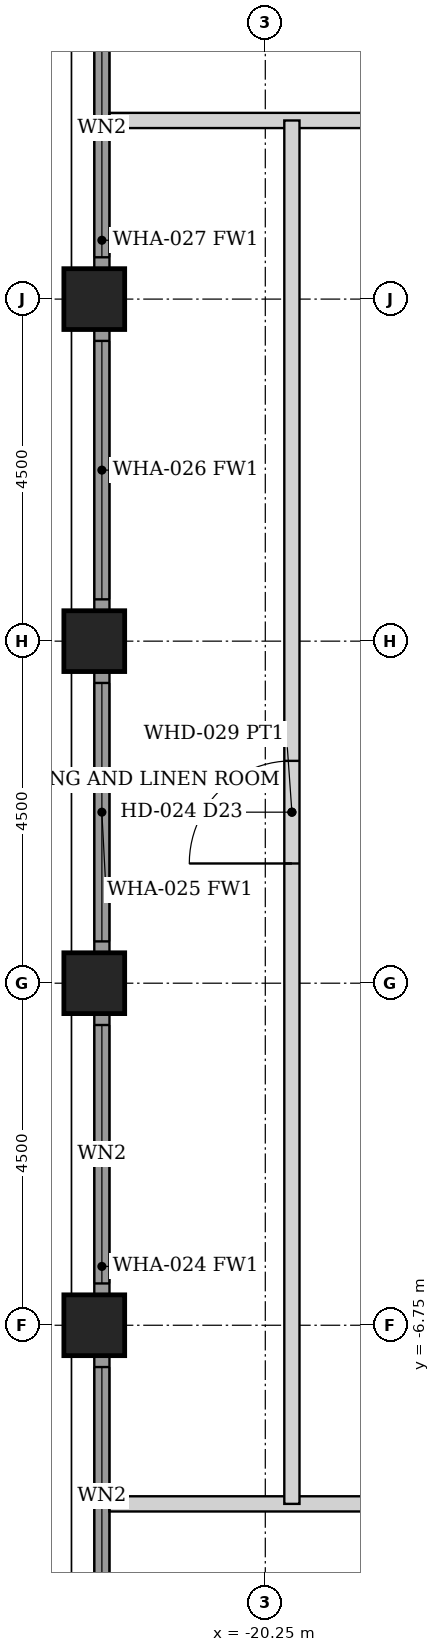
"""IFC4 building model, lengths in metres.
Left out: names, types, materials, properties, quantities, classifications, styles, units other than length and angle.
Written with IfcOpenShell. Run it as: python <this file> out.ifc"""

import sys

from ifc_helpers import new_model, si_unit, direction, frame, frame_2d, origin, origin_2d, place, context, subcontext, project, spatial, rectangle, hollow_rectangle, extrude, element, fill, save


model = new_model("IFC4")
c1 = context("Model", 3, precision=1e-05, world=origin(), true_north=direction((0.0, 1.0)))
c2 = subcontext(c1, "Body", "Model", "MODEL_VIEW")
j1 = project(units=[si_unit("LENGTHUNIT", "METRE"), si_unit("PLANEANGLEUNIT", "RADIAN")], contexts=[c1])
p1 = place(None, origin())
s1 = spatial("IfcSite", under=j1, at=p1, CompositionType="ELEMENT")
p2 = place(p1, origin())
s2 = spatial("IfcBuilding", under=s1, at=p2, CompositionType="ELEMENT")
p3 = place(p2, frame((0.0, 0.0, 150.8)))
s3 = spatial("IfcBuildingStorey", under=s2, at=p3, CompositionType="ELEMENT", Elevation=150.8)
for number, where, z_axis, x_axis in (
    (1, (-22.5, -6.75, 0.0), (0.0, 0.0, 1.0), (1.0, 0.0, 0.0)),
    (2, (-22.5, -2.25, 0.0), (0.0, 0.0, 1.0), (1.0, 0.0, 0.0)),
    (3, (-22.5, 2.25, 0.0), (0.0, 0.0, 1.0), (1.0, 0.0, 0.0)),
    (4, (-22.5, 6.75, 0.0), (0.0, 0.0, 1.0), (1.0, 0.0, 0.0)),
):
    element("IfcColumn", number, at=place(p3, frame(where, z_axis=z_axis, x_axis=x_axis)), inside=s3, PredefinedType="COLUMN", context=c2, shape_type="SweptSolid", body=[
        extrude(hollow_rectangle(XDim=0.8, YDim=0.8, WallThickness=0.05, at=origin_2d()), origin(), (0.0, 0.0, 1.0), 3.6),
    ])
p4 = place(p3, frame((-22.4, -10.845, 0.0), z_axis=(0.0, 0.0, 1.0), x_axis=(0.0, 1.0, 0.0)))
e5 = element("IfcWall", 5, at=p4, inside=s3, PredefinedType="SOLIDWALL", context=c2, shape_type="SweptSolid", body=[
    extrude(rectangle(XDim=3.69, YDim=0.2, at=frame_2d((1.845, 0.0))), origin(), (0.0, 0.0, 1.0), 2.479),
])
p5 = place(p4, frame((0.145, 0.0, 0.3)))
e6 = element("IfcOpeningElement", 6, at=p5, cuts=e5, PredefinedType="OPENING", context=c2, shape_type="SweptSolid", body=[
    extrude(rectangle(XDim=3.4, YDim=2.029, at=frame_2d((1.7, 1.015))), frame((0.0, 0.11, 0.0), z_axis=(0.0, -1.0, 0.0), x_axis=(1.0, 0.0, 0.0)), (0.0, 0.0, 1.0), 0.22),
])
p6 = place(p3, frame((-22.4, -6.345, 0.0), z_axis=(0.0, 0.0, 1.0), x_axis=(0.0, 1.0, 0.0)))
e7 = element("IfcWall", 7, at=p6, inside=s3, PredefinedType="SOLIDWALL", context=c2, shape_type="SweptSolid", body=[
    extrude(rectangle(XDim=3.69, YDim=0.2, at=frame_2d((1.845, 0.0))), origin(), (0.0, 0.0, 1.0), 2.479),
])
p7 = place(p6, frame((0.145, 0.0, 0.3)))
e8 = element("IfcOpeningElement", 8, at=p7, cuts=e7, PredefinedType="OPENING", context=c2, shape_type="SweptSolid", body=[
    extrude(rectangle(XDim=3.4, YDim=2.029, at=frame_2d((1.7, 1.015))), frame((0.0, 0.11, 0.0), z_axis=(0.0, -1.0, 0.0), x_axis=(1.0, 0.0, 0.0)), (0.0, 0.0, 1.0), 0.22),
])
p8 = place(p3, frame((-22.4, -1.845, 0.0), z_axis=(0.0, 0.0, 1.0), x_axis=(0.0, 1.0, 0.0)))
e9 = element("IfcWall", 9, at=p8, inside=s3, PredefinedType="SOLIDWALL", context=c2, shape_type="SweptSolid", body=[
    extrude(rectangle(XDim=3.69, YDim=0.2, at=frame_2d((1.845, 0.0))), origin(), (0.0, 0.0, 1.0), 2.479),
])
p9 = place(p8, frame((0.145, 0.0, 0.3)))
e10 = element("IfcOpeningElement", 10, at=p9, cuts=e9, PredefinedType="OPENING", context=c2, shape_type="SweptSolid", body=[
    extrude(rectangle(XDim=3.4, YDim=2.029, at=frame_2d((1.7, 1.015))), frame((0.0, 0.11, 0.0), z_axis=(0.0, -1.0, 0.0), x_axis=(1.0, 0.0, 0.0)), (0.0, 0.0, 1.0), 0.22),
])
p10 = place(p3, frame((-22.4, 2.655, 0.0), z_axis=(0.0, 0.0, 1.0), x_axis=(0.0, 1.0, 0.0)))
e11 = element("IfcWall", 11, at=p10, inside=s3, PredefinedType="SOLIDWALL", context=c2, shape_type="SweptSolid", body=[
    extrude(rectangle(XDim=3.69, YDim=0.2, at=frame_2d((1.845, 0.0))), origin(), (0.0, 0.0, 1.0), 2.479),
])
p11 = place(p10, frame((0.145, 0.0, 0.3)))
e12 = element("IfcOpeningElement", 12, at=p11, cuts=e11, PredefinedType="OPENING", context=c2, shape_type="SweptSolid", body=[
    extrude(rectangle(XDim=3.4, YDim=2.029, at=frame_2d((1.7, 1.015))), frame((0.0, 0.11, 0.0), z_axis=(0.0, -1.0, 0.0), x_axis=(1.0, 0.0, 0.0)), (0.0, 0.0, 1.0), 0.22),
])
p12 = place(p3, frame((-22.4, 7.155, 0.0), z_axis=(0.0, 0.0, 1.0), x_axis=(0.0, 1.0, 0.0)))
e13 = element("IfcWall", 13, at=p12, inside=s3, PredefinedType="SOLIDWALL", context=c2, shape_type="SweptSolid", body=[
    extrude(rectangle(XDim=3.69, YDim=0.2, at=frame_2d((1.845, 0.0))), origin(), (0.0, 0.0, 1.0), 2.479),
])
p13 = place(p12, frame((0.145, 0.0, 0.3)))
e14 = element("IfcOpeningElement", 14, at=p13, cuts=e13, PredefinedType="OPENING", context=c2, shape_type="SweptSolid", body=[
    extrude(rectangle(XDim=3.4, YDim=2.029, at=frame_2d((1.7, 1.015))), frame((0.0, 0.11, 0.0), z_axis=(0.0, -1.0, 0.0), x_axis=(1.0, 0.0, 0.0)), (0.0, 0.0, 1.0), 0.22),
])
p14 = place(p3, frame((-22.3, 9.1, 0.0), z_axis=(0.0, 0.0, 1.0), x_axis=(1.0, 0.0, 0.0)))
e15 = element("IfcWall", 15, at=p14, inside=s3, PredefinedType="PARTITIONING", context=c2, shape_type="SweptSolid", body=[
    extrude(rectangle(XDim=44.6, YDim=0.2, at=frame_2d((22.3, 0.0))), origin(), (0.0, 0.0, 1.0), 2.473),
])
p15 = place(p14, frame((6.75, 0.0, 0.0)))
e16 = element("IfcOpeningElement", 16, at=p15, cuts=e15, PredefinedType="OPENING", context=c2, shape_type="SweptSolid", body=[
    extrude(rectangle(XDim=0.9, YDim=2.1, at=frame_2d((0.45, 1.05))), frame((0.0, 0.11, 0.0), z_axis=(0.0, -1.0, 0.0), x_axis=(1.0, 0.0, 0.0)), (0.0, 0.0, 1.0), 0.22),
])
p16 = place(p14, frame((11.25, 0.0, 0.0)))
e17 = element("IfcOpeningElement", 17, at=p16, cuts=e15, PredefinedType="OPENING", context=c2, shape_type="SweptSolid", body=[
    extrude(rectangle(XDim=0.9, YDim=2.1, at=frame_2d((0.45, 1.05))), frame((0.0, 0.11, 0.0), z_axis=(0.0, -1.0, 0.0), x_axis=(1.0, 0.0, 0.0)), (0.0, 0.0, 1.0), 0.22),
])
p17 = place(p14, frame((23.45, 0.0, 0.0)))
e18 = element("IfcOpeningElement", 18, at=p17, cuts=e15, PredefinedType="OPENING", context=c2, shape_type="SweptSolid", body=[
    extrude(rectangle(XDim=0.9, YDim=2.1, at=frame_2d((0.45, 1.05))), frame((0.0, 0.11, 0.0), z_axis=(0.0, -1.0, 0.0), x_axis=(1.0, 0.0, 0.0)), (0.0, 0.0, 1.0), 0.22),
])
p18 = place(p14, frame((32.45, 0.0, 0.0)))
e19 = element("IfcOpeningElement", 19, at=p18, cuts=e15, PredefinedType="OPENING", context=c2, shape_type="SweptSolid", body=[
    extrude(rectangle(XDim=0.9, YDim=2.1, at=frame_2d((0.45, 1.05))), frame((0.0, 0.11, 0.0), z_axis=(0.0, -1.0, 0.0), x_axis=(1.0, 0.0, 0.0)), (0.0, 0.0, 1.0), 0.22),
])
p19 = place(p14, frame((33.75, 0.0, 0.0)))
e20 = element("IfcOpeningElement", 20, at=p19, cuts=e15, PredefinedType="OPENING", context=c2, shape_type="SweptSolid", body=[
    extrude(rectangle(XDim=0.9, YDim=2.1, at=frame_2d((0.45, 1.05))), frame((0.0, 0.11, 0.0), z_axis=(0.0, -1.0, 0.0), x_axis=(1.0, 0.0, 0.0)), (0.0, 0.0, 1.0), 0.22),
])
p20 = place(p14, frame((38.85, 0.0, 0.0)))
e21 = element("IfcOpeningElement", 21, at=p20, cuts=e15, PredefinedType="OPENING", context=c2, shape_type="SweptSolid", body=[
    extrude(rectangle(XDim=0.9, YDim=2.1, at=frame_2d((0.45, 1.05))), frame((0.0, 0.11, 0.0), z_axis=(0.0, -1.0, 0.0), x_axis=(1.0, 0.0, 0.0)), (0.0, 0.0, 1.0), 0.22),
])
p21 = place(p14, frame((4.85, 0.0, 0.0)))
e22 = element("IfcOpeningElement", 22, at=p21, cuts=e15, PredefinedType="OPENING", context=c2, shape_type="SweptSolid", body=[
    extrude(rectangle(XDim=0.9, YDim=2.1, at=frame_2d((0.45, 1.05))), frame((0.0, 0.11, 0.0), z_axis=(0.0, -1.0, 0.0), x_axis=(1.0, 0.0, 0.0)), (0.0, 0.0, 1.0), 0.22),
])
p22 = place(p3, frame((-22.3, -9.1, 0.0), z_axis=(0.0, 0.0, 1.0), x_axis=(1.0, 0.0, 0.0)))
e23 = element("IfcWall", 23, at=p22, inside=s3, PredefinedType="PARTITIONING", context=c2, shape_type="SweptSolid", body=[
    extrude(rectangle(XDim=44.6, YDim=0.2, at=frame_2d((22.3, 0.0))), origin(), (0.0, 0.0, 1.0), 2.473),
])
p23 = place(p22, frame((6.75, 0.0, 0.0)))
e24 = element("IfcOpeningElement", 24, at=p23, cuts=e23, PredefinedType="OPENING", context=c2, shape_type="SweptSolid", body=[
    extrude(rectangle(XDim=0.9, YDim=2.1, at=frame_2d((0.45, 1.05))), frame((0.0, 0.11, 0.0), z_axis=(0.0, -1.0, 0.0), x_axis=(1.0, 0.0, 0.0)), (0.0, 0.0, 1.0), 0.22),
])
p24 = place(p22, frame((15.75, 0.0, 0.0)))
e25 = element("IfcOpeningElement", 25, at=p24, cuts=e23, PredefinedType="OPENING", context=c2, shape_type="SweptSolid", body=[
    extrude(rectangle(XDim=0.9, YDim=2.1, at=frame_2d((0.45, 1.05))), frame((0.0, 0.11, 0.0), z_axis=(0.0, -1.0, 0.0), x_axis=(1.0, 0.0, 0.0)), (0.0, 0.0, 1.0), 0.22),
])
p25 = place(p22, frame((23.45, 0.0, 0.0)))
e26 = element("IfcOpeningElement", 26, at=p25, cuts=e23, PredefinedType="OPENING", context=c2, shape_type="SweptSolid", body=[
    extrude(rectangle(XDim=0.9, YDim=2.1, at=frame_2d((0.45, 1.05))), frame((0.0, 0.11, 0.0), z_axis=(0.0, -1.0, 0.0), x_axis=(1.0, 0.0, 0.0)), (0.0, 0.0, 1.0), 0.22),
])
p26 = place(p22, frame((24.75, 0.0, 0.0)))
e27 = element("IfcOpeningElement", 27, at=p26, cuts=e23, PredefinedType="OPENING", context=c2, shape_type="SweptSolid", body=[
    extrude(rectangle(XDim=0.9, YDim=2.1, at=frame_2d((0.45, 1.05))), frame((0.0, 0.11, 0.0), z_axis=(0.0, -1.0, 0.0), x_axis=(1.0, 0.0, 0.0)), (0.0, 0.0, 1.0), 0.22),
])
p27 = place(p22, frame((36.95, 0.0, 0.0)))
e28 = element("IfcOpeningElement", 28, at=p27, cuts=e23, PredefinedType="OPENING", context=c2, shape_type="SweptSolid", body=[
    extrude(rectangle(XDim=0.9, YDim=2.1, at=frame_2d((0.45, 1.05))), frame((0.0, 0.11, 0.0), z_axis=(0.0, -1.0, 0.0), x_axis=(1.0, 0.0, 0.0)), (0.0, 0.0, 1.0), 0.22),
])
p28 = place(p22, frame((38.85, 0.0, 0.0)))
e29 = element("IfcOpeningElement", 29, at=p28, cuts=e23, PredefinedType="OPENING", context=c2, shape_type="SweptSolid", body=[
    extrude(rectangle(XDim=0.9, YDim=2.1, at=frame_2d((0.45, 1.05))), frame((0.0, 0.11, 0.0), z_axis=(0.0, -1.0, 0.0), x_axis=(1.0, 0.0, 0.0)), (0.0, 0.0, 1.0), 0.22),
])
p29 = place(p22, frame((4.85, 0.0, 0.0)))
e30 = element("IfcOpeningElement", 30, at=p29, cuts=e23, PredefinedType="OPENING", context=c2, shape_type="SweptSolid", body=[
    extrude(rectangle(XDim=0.9, YDim=2.1, at=frame_2d((0.45, 1.05))), frame((0.0, 0.11, 0.0), z_axis=(0.0, -1.0, 0.0), x_axis=(1.0, 0.0, 0.0)), (0.0, 0.0, 1.0), 0.22),
])
p30 = place(p3, frame((-19.9, -9.1, 0.0), z_axis=(0.0, 0.0, 1.0), x_axis=(0.0, 1.0, 0.0)))
e31 = element("IfcWall", 31, at=p30, inside=s3, PredefinedType="PARTITIONING", context=c2, shape_type="SweptSolid", body=[
    extrude(rectangle(XDim=18.2, YDim=0.2, at=frame_2d((9.1, 0.0))), origin(), (0.0, 0.0, 1.0), 2.473),
])
p31 = place(p30, frame((8.425, 0.0, 0.0)))
e32 = element("IfcOpeningElement", 32, at=p31, cuts=e31, PredefinedType="OPENING", context=c2, shape_type="SweptSolid", body=[
    extrude(rectangle(XDim=1.35, YDim=2.1, at=frame_2d((0.675, 1.05))), frame((0.0, 0.11, 0.0), z_axis=(0.0, -1.0, 0.0), x_axis=(1.0, 0.0, 0.0)), (0.0, 0.0, 1.0), 0.22),
])
p32 = place(p5, origin())
e33 = element("IfcWindow", 33, at=p32, inside=s3, PartitioningType="SINGLE_PANEL", PredefinedType="WINDOW", context=c2, shape_type="SweptSolid", body=[
    extrude(rectangle(XDim=3.4, YDim=2.029, at=frame_2d((1.7, 1.015))), frame((0.0, 0.03, 0.0), z_axis=(0.0, -1.0, 0.0), x_axis=(1.0, 0.0, 0.0)), (0.0, 0.0, 1.0), 0.06),
])
fill(e6, e33)
p33 = place(p7, origin())
e34 = element("IfcWindow", 34, at=p33, inside=s3, PartitioningType="SINGLE_PANEL", PredefinedType="WINDOW", context=c2, shape_type="SweptSolid", body=[
    extrude(rectangle(XDim=3.4, YDim=2.029, at=frame_2d((1.7, 1.015))), frame((0.0, 0.03, 0.0), z_axis=(0.0, -1.0, 0.0), x_axis=(1.0, 0.0, 0.0)), (0.0, 0.0, 1.0), 0.06),
])
fill(e8, e34)
p34 = place(p9, origin())
e35 = element("IfcWindow", 35, at=p34, inside=s3, PartitioningType="SINGLE_PANEL", PredefinedType="WINDOW", context=c2, shape_type="SweptSolid", body=[
    extrude(rectangle(XDim=3.4, YDim=2.029, at=frame_2d((1.7, 1.015))), frame((0.0, 0.03, 0.0), z_axis=(0.0, -1.0, 0.0), x_axis=(1.0, 0.0, 0.0)), (0.0, 0.0, 1.0), 0.06),
])
fill(e10, e35)
p35 = place(p11, origin())
e36 = element("IfcWindow", 36, at=p35, inside=s3, PartitioningType="SINGLE_PANEL", PredefinedType="WINDOW", context=c2, shape_type="SweptSolid", body=[
    extrude(rectangle(XDim=3.4, YDim=2.029, at=frame_2d((1.7, 1.015))), frame((0.0, 0.03, 0.0), z_axis=(0.0, -1.0, 0.0), x_axis=(1.0, 0.0, 0.0)), (0.0, 0.0, 1.0), 0.06),
])
fill(e12, e36)
p36 = place(p13, origin())
e37 = element("IfcWindow", 37, at=p36, inside=s3, PartitioningType="SINGLE_PANEL", PredefinedType="WINDOW", context=c2, shape_type="SweptSolid", body=[
    extrude(rectangle(XDim=3.4, YDim=2.029, at=frame_2d((1.7, 1.015))), frame((0.0, 0.03, 0.0), z_axis=(0.0, -1.0, 0.0), x_axis=(1.0, 0.0, 0.0)), (0.0, 0.0, 1.0), 0.06),
])
fill(e14, e37)
p37 = place(p31, origin())
e38 = element("IfcDoor", 38, at=p37, inside=s3, OperationType="SINGLE_SWING_LEFT", PredefinedType="DOOR", context=c2, shape_type="SweptSolid", body=[
    extrude(rectangle(XDim=1.35, YDim=2.1, at=frame_2d((0.675, 1.05))), frame((0.0, 0.025, 0.0), z_axis=(0.0, -1.0, 0.0), x_axis=(1.0, 0.0, 0.0)), (0.0, 0.0, 1.0), 0.05),
])
fill(e32, e38)
save(model, sys.argv[1])
